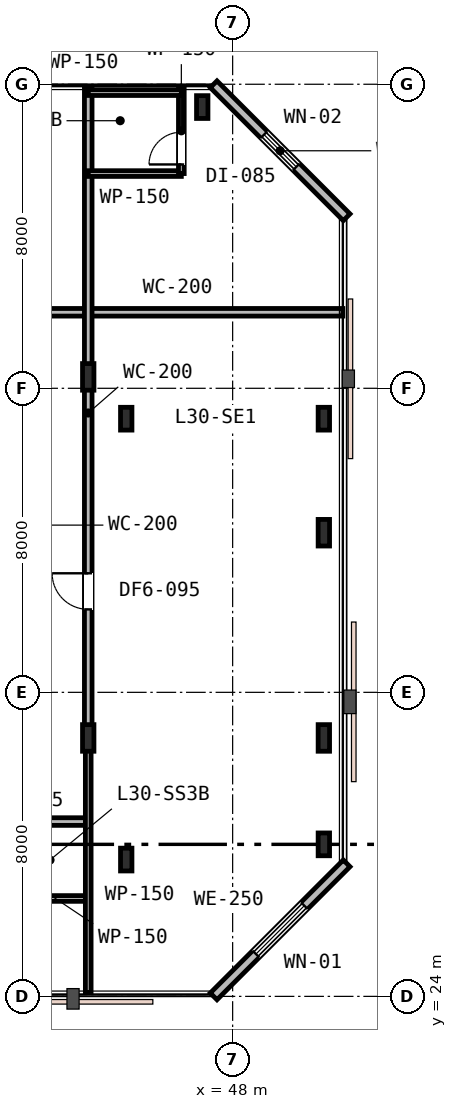
"""IFC4 building model, lengths in metres.
Left out: names, types, materials, properties, quantities, classifications, styles, units other than length and angle.
Written with IfcOpenShell. Run it as: python <this file> out.ifc"""

import sys

from ifc_helpers import new_model, si_unit, direction, frame, frame_2d, origin, origin_2d, place, context, subcontext, project, spatial, rectangle, i_section, extrude, element, fill, save


model = new_model("IFC4")
c1 = context("Model", 3, precision=1e-05, world=origin(), true_north=direction((0.0, 1.0)))
c2 = subcontext(c1, "Body", "Model", "MODEL_VIEW")
j1 = project(units=[si_unit("LENGTHUNIT", "METRE"), si_unit("PLANEANGLEUNIT", "RADIAN")], contexts=[c1])
p1 = place(None, origin())
s1 = spatial("IfcSite", under=j1, at=p1, CompositionType="ELEMENT")
p2 = place(p1, origin())
s2 = spatial("IfcBuilding", under=s1, at=p2, CompositionType="ELEMENT")
p3 = place(p2, frame((0.0, 0.0, 118.8)))
s3 = spatial("IfcBuildingStorey", under=s2, at=p3, CompositionType="ELEMENT", Elevation=118.8)
for number, where, z_axis, x_axis in (
    (1, (45.2, 27.6, 0.0), (0.0, 0.0, 1.0), (1.0, 0.0, 0.0)),
    (2, (45.2, 39.2, 0.0), (0.0, 0.0, 1.0), (1.0, 0.0, 0.0)),
    (3, (47.2, 47.4, 0.0), (0.0, 0.0, 1.0), (1.0, 0.0, 0.0)),
    (4, (50.4, 28.0, 0.0), (0.0, 0.0, 1.0), (1.0, 0.0, 0.0)),
    (5, (50.4, 39.2, 0.0), (0.0, 0.0, 1.0), (1.0, 0.0, 0.0)),
):
    element("IfcColumn", number, at=place(p3, frame(where, z_axis=z_axis, x_axis=x_axis)), inside=s3, PredefinedType="COLUMN", context=c2, shape_type="SweptSolid", body=[
        extrude(i_section(OverallWidth=0.3, OverallDepth=0.6, WebThickness=0.015, FlangeThickness=0.03, FilletRadius=0.027, at=origin_2d()), origin(), (0.0, 0.0, 1.0), 3.6),
    ])
for number, where, z_axis, x_axis in (
    (6, (44.2, 30.8, 0.0), (0.0, 0.0, 1.0), (1.0, 0.0, 0.0)),
    (7, (44.2, 40.3, 0.0), (0.0, 0.0, 1.0), (1.0, 0.0, 0.0)),
    (8, (50.4, 30.8, 0.0), (0.0, 0.0, 1.0), (1.0, 0.0, 0.0)),
    (9, (50.4, 36.2, 0.0), (0.0, 0.0, 1.0), (1.0, 0.0, 0.0)),
):
    element("IfcColumn", number, at=place(p3, frame(where, z_axis=z_axis, x_axis=x_axis)), inside=s3, PredefinedType="COLUMN", context=c2, shape_type="SweptSolid", body=[
        extrude(i_section(OverallWidth=0.3, OverallDepth=0.7, WebThickness=0.017, FlangeThickness=0.032, FilletRadius=0.027, at=origin_2d()), origin(), (0.0, 0.0, 1.0), 3.6),
    ])
p4 = place(p3, frame((47.5, 24.0, 0.0), z_axis=(0.0, 0.0, 1.0), x_axis=(0.707106781187, 0.707106781187, 0.0)))
e10 = element("IfcWall", 10, at=p4, inside=s3, PredefinedType="STANDARD", context=c2, shape_type="SweptSolid", body=[
    extrude(rectangle(XDim=4.95, YDim=0.25, at=frame_2d((2.475, 0.0))), origin(), (0.0, 0.0, 1.0), 3.33),
])
p5 = place(p4, frame((1.575, 0.0, 0.75)))
e11 = element("IfcOpeningElement", 11, at=p5, cuts=e10, PredefinedType="OPENING", context=c2, shape_type="SweptSolid", body=[
    extrude(rectangle(XDim=1.8, YDim=1.85, at=frame_2d((0.9, 0.925))), frame((0.0, 0.135, 0.0), z_axis=(0.0, -1.0, 0.0), x_axis=(1.0, 0.0, 0.0)), (0.0, 0.0, 1.0), 0.27),
])
p6 = place(p3, frame((51.0, 44.5, 0.0), z_axis=(0.0, 0.0, 1.0), x_axis=(-0.707106781187, 0.707106781187, 0.0)))
e12 = element("IfcWall", 12, at=p6, inside=s3, PredefinedType="STANDARD", context=c2, shape_type="SweptSolid", body=[
    extrude(rectangle(XDim=4.95, YDim=0.25, at=frame_2d((2.475, 0.0))), origin(), (0.0, 0.0, 1.0), 3.33),
])
p7 = place(p6, frame((1.875, 0.0, 0.85)))
e13 = element("IfcOpeningElement", 13, at=p7, cuts=e12, PredefinedType="OPENING", context=c2, shape_type="SweptSolid", body=[
    extrude(rectangle(XDim=1.2, YDim=1.6, at=frame_2d((0.6, 0.8))), frame((0.0, 0.135, 0.0), z_axis=(0.0, -1.0, 0.0), x_axis=(1.0, 0.0, 0.0)), (0.0, 0.0, 1.0), 0.27),
])
p8 = place(p3, frame((13.6, 28.6, 0.0), z_axis=(0.0, 0.0, 1.0), x_axis=(1.0, 0.0, 0.0)))
e14 = element("IfcWall", 14, at=p8, inside=s3, PredefinedType="PARTITIONING", context=c2, shape_type="SweptSolid", body=[
    extrude(rectangle(XDim=30.6, YDim=0.2, at=frame_2d((15.3, 0.0))), origin(), (0.0, 0.0, 1.0), 2.87),
])
p9 = place(p8, frame((13.325, 0.0, 0.0)))
e15 = element("IfcOpeningElement", 15, at=p9, cuts=e14, PredefinedType="OPENING", context=c2, shape_type="SweptSolid", body=[
    extrude(rectangle(XDim=0.95, YDim=2.15, at=frame_2d((0.475, 1.075))), frame((0.0, 0.11, 0.0), z_axis=(0.0, -1.0, 0.0), x_axis=(1.0, 0.0, 0.0)), (0.0, 0.0, 1.0), 0.22),
])
p10 = place(p8, frame((18.761, 0.0, 0.0)))
e16 = element("IfcOpeningElement", 16, at=p10, cuts=e14, PredefinedType="OPENING", context=c2, shape_type="SweptSolid", body=[
    extrude(rectangle(XDim=0.95, YDim=2.15, at=frame_2d((0.475, 1.075))), frame((0.0, 0.11, 0.0), z_axis=(0.0, -1.0, 0.0), x_axis=(1.0, 0.0, 0.0)), (0.0, 0.0, 1.0), 0.22),
])
p11 = place(p8, frame((25.503, 0.0, 0.0)))
e17 = element("IfcOpeningElement", 17, at=p11, cuts=e14, PredefinedType="OPENING", context=c2, shape_type="SweptSolid", body=[
    extrude(rectangle(XDim=0.95, YDim=2.15, at=frame_2d((0.475, 1.075))), frame((0.0, 0.11, 0.0), z_axis=(0.0, -1.0, 0.0), x_axis=(1.0, 0.0, 0.0)), (0.0, 0.0, 1.0), 0.22),
])
p12 = place(p3, frame((42.2, 42.0, 0.0), z_axis=(0.0, 0.0, 1.0), x_axis=(1.0, 0.0, 0.0)))
e18 = element("IfcWall", 18, at=p12, inside=s3, PredefinedType="PARTITIONING", context=c2, shape_type="SweptSolid", body=[
    extrude(rectangle(XDim=8.7, YDim=0.2, at=frame_2d((4.35, 0.0))), origin(), (0.0, 0.0, 1.0), 3.33),
])
p13 = place(p3, frame((41.824, 26.576, 0.0), z_axis=(0.0, 0.0, 1.0), x_axis=(1.0, 0.0, 0.0)))
e19 = element("IfcWall", 19, at=p13, inside=s3, PredefinedType="PARTITIONING", context=c2, shape_type="SweptSolid", body=[
    extrude(rectangle(XDim=2.376, YDim=0.15, at=frame_2d((1.188, 0.0))), origin(), (0.0, 0.0, 1.0), 3.33),
])
p14 = place(p3, frame((44.2, 30.8, 0.0), z_axis=(0.0, 0.0, 1.0), x_axis=(0.0, -1.0, 0.0)))
e20 = element("IfcWall", 20, at=p14, inside=s3, PredefinedType="PARTITIONING", context=c2, shape_type="SweptSolid", body=[
    extrude(rectangle(XDim=6.7, YDim=0.15, at=frame_2d((3.35, 0.0))), origin(), (0.0, 0.0, 1.0), 2.87),
])
p15 = place(p3, frame((44.2, 30.8, 0.0), z_axis=(0.0, 0.0, 1.0), x_axis=(0.0, 1.0, 0.0)))
e21 = element("IfcWall", 21, at=p15, inside=s3, PredefinedType="PARTITIONING", context=c2, shape_type="SweptSolid", body=[
    extrude(rectangle(XDim=17.1, YDim=0.2, at=frame_2d((8.55, 0.0))), origin(), (0.0, 0.0, 1.0), 2.87),
])
p16 = place(p15, frame((3.382, 0.0, 0.0)))
e22 = element("IfcOpeningElement", 22, at=p16, cuts=e21, PredefinedType="OPENING", context=c2, shape_type="SweptSolid", body=[
    extrude(rectangle(XDim=0.95, YDim=2.15, at=frame_2d((0.475, 1.075))), frame((0.0, 0.11, 0.0), z_axis=(0.0, -1.0, 0.0), x_axis=(1.0, 0.0, 0.0)), (0.0, 0.0, 1.0), 0.22),
])
p17 = place(p3, frame((44.2, 45.65, 0.0), z_axis=(0.0, 0.0, 1.0), x_axis=(1.0, 0.0, 0.0)))
e23 = element("IfcWall", 23, at=p17, inside=s3, PredefinedType="PARTITIONING", context=c2, shape_type="SweptSolid", body=[
    extrude(rectangle(XDim=2.45, YDim=0.15, at=frame_2d((1.225, 0.0))), origin(), (0.0, 0.0, 1.0), 3.33),
])
p18 = place(p3, frame((46.65, 45.65, 0.0), z_axis=(0.0, 0.0, 1.0), x_axis=(0.0, 1.0, 0.0)))
e24 = element("IfcWall", 24, at=p18, inside=s3, PredefinedType="PARTITIONING", context=c2, shape_type="SweptSolid", body=[
    extrude(rectangle(XDim=2.25, YDim=0.15, at=frame_2d((1.125, 0.0))), origin(), (0.0, 0.0, 1.0), 2.96),
])
p19 = place(p18, frame((0.24, 0.0, 0.0)))
e25 = element("IfcOpeningElement", 25, at=p19, cuts=e24, PredefinedType="OPENING", context=c2, shape_type="SweptSolid", body=[
    extrude(rectangle(XDim=0.85, YDim=2.15, at=frame_2d((0.425, 1.075))), frame((0.0, 0.085, 0.0), z_axis=(0.0, -1.0, 0.0), x_axis=(1.0, 0.0, 0.0)), (0.0, 0.0, 1.0), 0.17),
])
p20 = place(p3, frame((44.2, 47.78, 0.0), z_axis=(0.0, 0.0, 1.0), x_axis=(1.0, 0.0, 0.0)))
e26 = element("IfcWall", 26, at=p20, inside=s3, PredefinedType="PARTITIONING", context=c2, shape_type="SweptSolid", body=[
    extrude(rectangle(XDim=2.45, YDim=0.15, at=frame_2d((1.225, 0.0))), origin(), (0.0, 0.0, 1.0), 2.96),
])
p21 = place(p5, origin())
e27 = element("IfcWindow", 27, at=p21, inside=s3, PartitioningType="SINGLE_PANEL", PredefinedType="WINDOW", context=c2, shape_type="SweptSolid", body=[
    extrude(rectangle(XDim=1.8, YDim=1.85, at=frame_2d((0.9, 0.925))), frame((0.0, 0.03, 0.0), z_axis=(0.0, -1.0, 0.0), x_axis=(1.0, 0.0, 0.0)), (0.0, 0.0, 1.0), 0.06),
])
fill(e11, e27)
p22 = place(p7, origin())
e28 = element("IfcWindow", 28, at=p22, inside=s3, PartitioningType="SINGLE_PANEL", PredefinedType="WINDOW", context=c2, shape_type="SweptSolid", body=[
    extrude(rectangle(XDim=1.2, YDim=1.6, at=frame_2d((0.6, 0.8))), frame((0.0, 0.03, 0.0), z_axis=(0.0, -1.0, 0.0), x_axis=(1.0, 0.0, 0.0)), (0.0, 0.0, 1.0), 0.06),
])
fill(e13, e28)
p23 = place(p16, origin())
e29 = element("IfcDoor", 29, at=p23, inside=s3, OperationType="SINGLE_SWING_RIGHT", PredefinedType="DOOR", context=c2, shape_type="SweptSolid", body=[
    extrude(rectangle(XDim=0.95, YDim=2.15, at=frame_2d((0.475, 1.075))), frame((0.0, 0.025, 0.0), z_axis=(0.0, -1.0, 0.0), x_axis=(1.0, 0.0, 0.0)), (0.0, 0.0, 1.0), 0.05),
])
fill(e22, e29)
p24 = place(p19, origin())
e30 = element("IfcDoor", 30, at=p24, inside=s3, OperationType="SINGLE_SWING_LEFT", PredefinedType="DOOR", context=c2, shape_type="SweptSolid", body=[
    extrude(rectangle(XDim=0.85, YDim=2.15, at=frame_2d((0.425, 1.075))), frame((0.0, 0.025, 0.0), z_axis=(0.0, -1.0, 0.0), x_axis=(1.0, 0.0, 0.0)), (0.0, 0.0, 1.0), 0.05),
])
fill(e25, e30)
save(model, sys.argv[1])
